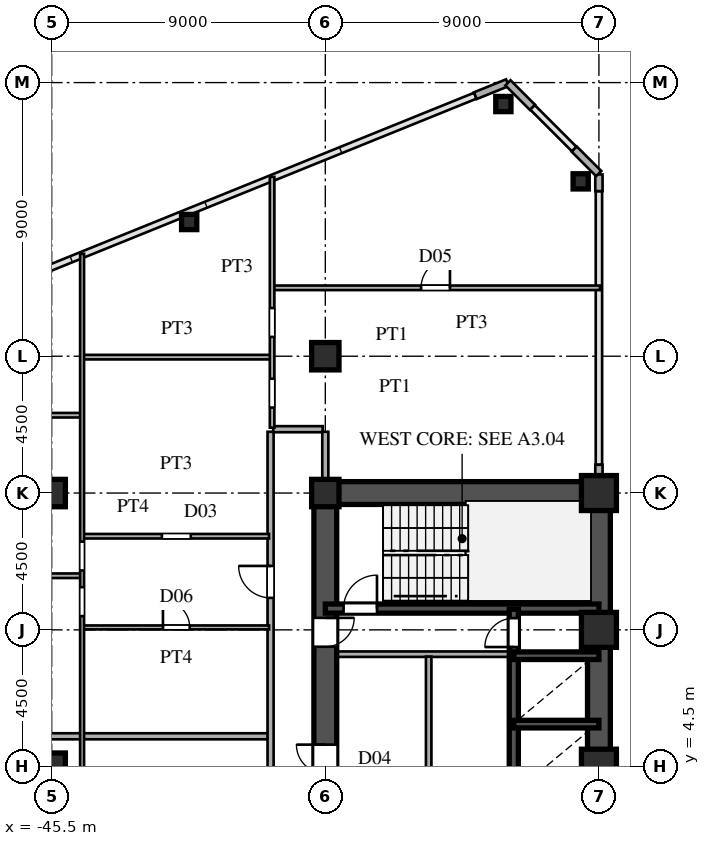
"""IFC4 building model, lengths in metres.
Left out: names, types, materials, properties, quantities, classifications, styles, units other than length and angle.
Written with IfcOpenShell. Run it as: python <this file> out.ifc"""

import sys

from ifc_helpers import new_model, si_unit, direction, frame, frame_2d, origin, origin_2d, place, context, subcontext, project, spatial, rectangle, hollow_rectangle, i_section, extrude, source, transform, mapped, element, fill, save


model = new_model("IFC4")
c1 = context("Model", 3, precision=1e-05, world=origin(), true_north=direction((0.0, 1.0)))
c2 = subcontext(c1, "Body", "Model", "MODEL_VIEW")
j1 = project(units=[si_unit("LENGTHUNIT", "METRE"), si_unit("PLANEANGLEUNIT", "RADIAN")], contexts=[c1])
p1 = place(None, origin())
s1 = spatial("IfcSite", under=j1, at=p1, CompositionType="ELEMENT")
p2 = place(p1, origin())
s2 = spatial("IfcBuilding", under=s1, at=p2, CompositionType="ELEMENT")
p3 = place(p2, frame((0.0, 0.0, 44.1)))
s3 = spatial("IfcBuildingStorey", under=s2, at=p3, CompositionType="ELEMENT", Elevation=44.1)
m1 = source(origin(), c2, "Body", "SweptSolid", [
    extrude(hollow_rectangle(XDim=1.15, YDim=1.15, WallThickness=0.048, at=origin_2d()), origin(), (0.0, 0.0, 1.0), 3.6),
])
for number, where, z_axis, x_axis in (
    (1, (-27.5, 4.5, 0.0), (0.0, 0.0, 1.0), (1.0, 0.0, 0.0)),
    (2, (-27.5, 9.0, 0.0), (0.0, 0.0, 1.0), (1.0, 0.0, 0.0)),
    (3, (-27.5, 13.5, 0.0), (0.0, 0.0, 1.0), (1.0, 0.0, 0.0)),
):
    element("IfcColumn", number, at=place(p3, frame(where, z_axis=z_axis, x_axis=x_axis)), inside=s3, PredefinedType="COLUMN", context=c2, shape_type="MappedRepresentation", body=[
        mapped(m1, transform((0.0, 0.0, 0.0), scale=1.0)),
    ])
m2 = source(origin(), c2, "Body", "SweptSolid", [
    extrude(i_section(OverallWidth=0.9, OverallDepth=0.9, WebThickness=0.036, FlangeThickness=0.055, at=origin_2d()), origin(), (0.0, 0.0, 1.0), 3.6),
])
for number, where, z_axis, x_axis in (
    (4, (-36.5, 13.5, 0.0), (0.0, 0.0, 1.0), (1.0, 0.0, 0.0)),
    (5, (-36.5, 18.0, 0.0), (0.0, 0.0, 1.0), (1.0, 0.0, 0.0)),
    (6, (-45.5, 4.5, 0.0), (0.0, 0.0, 1.0), (1.0, 0.0, 0.0)),
    (7, (-45.5, 13.5, 0.0), (0.0, 0.0, 1.0), (1.0, 0.0, 0.0)),
):
    element("IfcColumn", number, at=place(p3, frame(where, z_axis=z_axis, x_axis=x_axis)), inside=s3, PredefinedType="COLUMN", context=c2, shape_type="MappedRepresentation", body=[
        mapped(m2, transform((0.0, 0.0, 0.0), scale=1.0)),
    ])
m3 = source(origin(), c2, "Body", "SweptSolid", [
    extrude(hollow_rectangle(XDim=0.5, YDim=0.5, WallThickness=0.02, at=origin_2d()), origin(), (0.0, 0.0, 1.0), 3.6),
])
for number, where, z_axis, x_axis in (
    (8, (-28.1, 23.751, 0.0), (0.0, 0.0, 1.0), (1.0, 0.0, 0.0)),
    (9, (-30.643, 26.295, 0.0), (0.0, 0.0, 1.0), (1.0, 0.0, 0.0)),
    (10, (-40.977, 22.414, 0.0), (0.0, 0.0, 1.0), (1.0, 0.0, 0.0)),
):
    element("IfcColumn", number, at=place(p3, frame(where, z_axis=z_axis, x_axis=x_axis)), inside=s3, PredefinedType="COLUMN", context=c2, shape_type="MappedRepresentation", body=[
        mapped(m3, transform((0.0, 0.0, 0.0), scale=1.0)),
    ])
p4 = place(p3, frame((-27.5, 13.88, 0.0), z_axis=(0.0, 0.0, 1.0), x_axis=(0.0, 1.0, 0.0)))
e11 = element("IfcWall", 11, at=p4, inside=s3, PredefinedType="SOLIDWALL", context=c2, shape_type="SweptSolid", body=[
    extrude(rectangle(XDim=0.55, YDim=0.24, at=frame_2d((0.275, 0.0))), origin(), (0.0, 0.0, 1.0), 2.88),
])
p5 = place(p3, frame((-27.5, 23.43, 0.0), z_axis=(0.0, 0.0, 1.0), x_axis=(0.0, 1.0, 0.0)))
e12 = element("IfcWall", 12, at=p5, inside=s3, PredefinedType="SOLIDWALL", context=c2, shape_type="SweptSolid", body=[
    extrude(rectangle(XDim=0.55, YDim=0.24, at=frame_2d((0.275, 0.0))), origin(), (0.0, 0.0, 1.0), 3.38),
])
for number, where, z_axis, x_axis in (
    (13, (-27.507, 24.007, 0.0), (0.0, 0.0, 1.0), (-0.707, 0.707, 0.0)),
    (14, (-29.687, 26.187, 0.0), (0.0, 0.0, 1.0), (-0.707, 0.707, 0.0)),
):
    element("IfcWall", number, at=place(p3, frame(where, z_axis=z_axis, x_axis=x_axis)), inside=s3, PredefinedType="SOLIDWALL", context=c2, shape_type="SweptSolid", body=[
        extrude(rectangle(XDim=1.14, YDim=0.24, at=frame_2d((0.57, 0.0))), origin(), (0.0, 0.0, 1.0), 3.38),
    ])
p6 = place(p3, frame((-30.509, 26.996, 0.0), z_axis=(0.0, 0.0, 1.0), x_axis=(-0.927007103665, -0.375043770452, 0.0)))
e15 = element("IfcWall", 15, at=p6, inside=s3, PredefinedType="SOLIDWALL", context=c2, shape_type="SweptSolid", body=[
    extrude(rectangle(XDim=1.14, YDim=0.24, at=frame_2d((0.57, 0.0))), origin(), (0.0, 0.0, 1.0), 3.38),
])
p7 = place(p3, frame((-27.5, 1.3, 0.0), z_axis=(0.0, 0.0, 1.0), x_axis=(0.0, 1.0, 0.0)))
e16 = element("IfcWall", 16, at=p7, inside=s3, PredefinedType="SHEAR", context=c2, shape_type="SweptSolid", body=[
    extrude(rectangle(XDim=12.2, YDim=0.75, at=frame_2d((6.1, 0.0))), origin(), (0.0, 0.0, 1.0), 3.38),
])
p8 = place(p3, frame((-36.5, 13.5, 0.0), z_axis=(0.0, 0.0, 1.0), x_axis=(1.0, 0.0, 0.0)))
e17 = element("IfcWall", 17, at=p8, inside=s3, PredefinedType="SHEAR", context=c2, shape_type="SweptSolid", body=[
    extrude(rectangle(XDim=9.0, YDim=0.75, at=frame_2d((4.5, 0.0))), origin(), (0.0, 0.0, 1.0), 3.38),
])
p9 = place(p3, frame((-36.5, 8.2, 0.0), z_axis=(0.0, 0.0, 1.0), x_axis=(0.0, 1.0, 0.0)))
e18 = element("IfcWall", 18, at=p9, inside=s3, PredefinedType="SHEAR", context=c2, shape_type="SweptSolid", body=[
    extrude(rectangle(XDim=5.45, YDim=0.75, at=frame_2d((2.725, 0.0))), origin(), (0.0, 0.0, 1.0), 3.38),
])
p10 = place(p9, frame((0.245, 0.0, 0.0)))
e19 = element("IfcOpeningElement", 19, at=p10, cuts=e18, PredefinedType="OPENING", context=c2, shape_type="SweptSolid", body=[
    extrude(rectangle(XDim=0.95, YDim=2.15, at=frame_2d((0.475, 1.075))), frame((0.0, 0.385, 0.0), z_axis=(0.0, -1.0, 0.0), x_axis=(1.0, 0.0, 0.0)), (0.0, 0.0, 1.0), 0.77),
])
p11 = place(p3, frame((-36.5, 1.3, 0.0), z_axis=(0.0, 0.0, 1.0), x_axis=(0.0, 1.0, 0.0)))
e20 = element("IfcWall", 20, at=p11, inside=s3, PredefinedType="SHEAR", context=c2, shape_type="SweptSolid", body=[
    extrude(rectangle(XDim=6.9, YDim=0.75, at=frame_2d((3.45, 0.0))), origin(), (0.0, 0.0, 1.0), 3.38),
])
p12 = place(p11, frame((2.975, 0.0, 0.0)))
e21 = element("IfcOpeningElement", 21, at=p12, cuts=e20, PredefinedType="OPENING", context=c2, shape_type="SweptSolid", body=[
    extrude(rectangle(XDim=0.95, YDim=2.15, at=frame_2d((0.475, 1.075))), frame((0.0, 0.385, 0.0), z_axis=(0.0, -1.0, 0.0), x_axis=(1.0, 0.0, 0.0)), (0.0, 0.0, 1.0), 0.77),
])
p13 = place(p3, frame((-36.5, 9.7, 0.0), z_axis=(0.0, 0.0, 1.0), x_axis=(1.0, 0.0, 0.0)))
e22 = element("IfcWall", 22, at=p13, inside=s3, PredefinedType="SHEAR", context=c2, shape_type="SweptSolid", body=[
    extrude(rectangle(XDim=9.0, YDim=0.3, at=frame_2d((4.5, 0.0))), origin(), (0.0, 0.0, 1.0), 3.38),
])
p14 = place(p13, frame((0.6, 0.0, 0.0)))
e23 = element("IfcOpeningElement", 23, at=p14, cuts=e22, PredefinedType="OPENING", context=c2, shape_type="SweptSolid", body=[
    extrude(rectangle(XDim=1.1, YDim=2.2, at=frame_2d((0.55, 1.1))), frame((0.0, 0.16, 0.0), z_axis=(0.0, -1.0, 0.0), x_axis=(1.0, 0.0, 0.0)), (0.0, 0.0, 1.0), 0.32),
])
for number, where, z_axis, x_axis in (
    (24, (-30.3, 5.9, 0.0), (0.0, 0.0, 1.0), (1.0, 0.0, 0.0)),
    (25, (-30.3, 8.15, 0.0), (0.0, 0.0, 1.0), (1.0, 0.0, 0.0)),
):
    element("IfcWall", number, at=place(p3, frame(where, z_axis=z_axis, x_axis=x_axis)), inside=s3, PredefinedType="SHEAR", context=c2, shape_type="SweptSolid", body=[
        extrude(rectangle(XDim=2.8, YDim=0.25, at=frame_2d((1.4, 0.0))), origin(), (0.0, 0.0, 1.0), 3.38),
    ])
p15 = place(p3, frame((-30.3, 3.6, 0.0), z_axis=(0.0, 0.0, 1.0), x_axis=(0.0, 1.0, 0.0)))
e26 = element("IfcWall", 26, at=p15, inside=s3, PredefinedType="SHEAR", context=c2, shape_type="SweptSolid", body=[
    extrude(rectangle(XDim=2.3, YDim=0.3, at=frame_2d((1.15, 0.0))), origin(), (0.0, 0.0, 1.0), 3.38),
])
p16 = place(p3, frame((-30.3, 5.9, 0.0), z_axis=(0.0, 0.0, 1.0), x_axis=(0.0, 1.0, 0.0)))
e27 = element("IfcWall", 27, at=p16, inside=s3, PredefinedType="SHEAR", context=c2, shape_type="SweptSolid", body=[
    extrude(rectangle(XDim=2.25, YDim=0.3, at=frame_2d((1.125, 0.0))), origin(), (0.0, 0.0, 1.0), 3.38),
])
p17 = place(p3, frame((-30.3, 8.15, 0.0), z_axis=(0.0, 0.0, 1.0), x_axis=(0.0, 1.0, 0.0)))
e28 = element("IfcWall", 28, at=p17, inside=s3, PredefinedType="SHEAR", context=c2, shape_type="SweptSolid", body=[
    extrude(rectangle(XDim=1.53, YDim=0.3, at=frame_2d((0.765, 0.0))), origin(), (0.0, 0.0, 1.0), 3.38),
])
p18 = place(p17, frame((0.285, 0.0, 0.0)))
e29 = element("IfcOpeningElement", 29, at=p18, cuts=e28, PredefinedType="OPENING", context=c2, shape_type="SweptSolid", body=[
    extrude(rectangle(XDim=0.95, YDim=2.15, at=frame_2d((0.475, 1.075))), frame((0.0, 0.16, 0.0), z_axis=(0.0, -1.0, 0.0), x_axis=(1.0, 0.0, 0.0)), (0.0, 0.0, 1.0), 0.32),
])
p19 = place(p3, frame((-36.15, 8.2, 0.0), z_axis=(0.0, 0.0, 1.0), x_axis=(1.0, 0.0, 0.0)))
e30 = element("IfcWall", 30, at=p19, inside=s3, PredefinedType="PARTITIONING", context=c2, shape_type="SweptSolid", body=[
    extrude(rectangle(XDim=5.7, YDim=0.18, at=frame_2d((2.85, 0.0))), origin(), (0.0, 0.0, 1.0), 3.38),
])
p20 = place(p3, frame((-33.1, 1.38, 0.0), z_axis=(0.0, 0.0, 1.0), x_axis=(0.0, 1.0, 0.0)))
e31 = element("IfcWall", 31, at=p20, inside=s3, PredefinedType="PARTITIONING", context=c2, shape_type="SweptSolid", body=[
    extrude(rectangle(XDim=6.74, YDim=0.18, at=frame_2d((3.37, 0.0))), origin(), (0.0, 0.0, 1.0), 3.38),
])
p21 = place(p3, frame((-72.505, 5.5, 0.0), z_axis=(0.0, 0.0, 1.0), x_axis=(1.0, 0.0, 0.0)))
e32 = element("IfcWall", 32, at=p21, inside=s3, PredefinedType="PARTITIONING", context=c2, shape_type="SweptSolid", body=[
    extrude(rectangle(XDim=34.125, YDim=0.2, at=frame_2d((17.062, 0.0))), origin(), (0.0, 0.0, 1.0), 3.38),
])
p22 = place(p3, frame((-44.45, 9.08, 0.0), z_axis=(0.0, 0.0, 1.0), x_axis=(1.0, 0.0, 0.0)))
e33 = element("IfcWall", 33, at=p22, inside=s3, PredefinedType="PARTITIONING", context=c2, shape_type="SweptSolid", body=[
    extrude(rectangle(XDim=6.1, YDim=0.13, at=frame_2d((3.05, 0.0))), origin(), (0.0, 0.0, 1.0), 3.38),
])
p23 = place(p22, frame((2.61, 0.0, 0.0)))
e34 = element("IfcOpeningElement", 34, at=p23, cuts=e33, PredefinedType="OPENING", context=c2, shape_type="SweptSolid", body=[
    extrude(rectangle(XDim=0.88, YDim=2.1, at=frame_2d((0.44, 1.05))), frame((0.0, 0.075, 0.0), z_axis=(0.0, -1.0, 0.0), x_axis=(1.0, 0.0, 0.0)), (0.0, 0.0, 1.0), 0.15),
])
p24 = place(p3, frame((-70.613, 10.78, 0.0), z_axis=(0.0, 0.0, 1.0), x_axis=(1.0, 0.0, 0.0)))
e35 = element("IfcWall", 35, at=p24, inside=s3, PredefinedType="PARTITIONING", context=c2, shape_type="SweptSolid", body=[
    extrude(rectangle(XDim=26.063, YDim=0.15, at=frame_2d((13.031, 0.0))), origin(), (0.0, 0.0, 1.0), 3.38),
])
p25 = place(p24, frame((4.749, 0.0, 0.0)))
e36 = element("IfcOpeningElement", 36, at=p25, cuts=e35, PredefinedType="OPENING", context=c2, shape_type="SweptSolid", body=[
    extrude(rectangle(XDim=0.95, YDim=2.15, at=frame_2d((0.475, 1.075))), frame((0.0, 0.085, 0.0), z_axis=(0.0, -1.0, 0.0), x_axis=(1.0, 0.0, 0.0)), (0.0, 0.0, 1.0), 0.17),
])
p26 = place(p3, frame((-44.45, 12.08, 0.0), z_axis=(0.0, 0.0, 1.0), x_axis=(1.0, 0.0, 0.0)))
e37 = element("IfcWall", 37, at=p26, inside=s3, PredefinedType="PARTITIONING", context=c2, shape_type="SweptSolid", body=[
    extrude(rectangle(XDim=6.1, YDim=0.15, at=frame_2d((3.05, 0.0))), origin(), (0.0, 0.0, 1.0), 3.38),
])
p27 = place(p26, frame((2.575, 0.0, 0.0)))
e38 = element("IfcOpeningElement", 38, at=p27, cuts=e37, PredefinedType="OPENING", context=c2, shape_type="SweptSolid", body=[
    extrude(rectangle(XDim=0.95, YDim=2.15, at=frame_2d((0.475, 1.075))), frame((0.0, 0.085, 0.0), z_axis=(0.0, -1.0, 0.0), x_axis=(1.0, 0.0, 0.0)), (0.0, 0.0, 1.0), 0.17),
])
p28 = place(p3, frame((-38.215, 15.6, 0.0), z_axis=(0.0, 0.0, 1.0), x_axis=(1.0, 0.0, 0.0)))
e39 = element("IfcWall", 39, at=p28, inside=s3, PredefinedType="PARTITIONING", context=c2, shape_type="SweptSolid", body=[
    extrude(rectangle(XDim=1.63, YDim=0.2, at=frame_2d((0.815, 0.0))), origin(), (0.0, 0.0, 1.0), 3.38),
])
p29 = place(p3, frame((-54.45, 16.06, 0.0), z_axis=(0.0, 0.0, 1.0), x_axis=(1.0, 0.0, 0.0)))
e40 = element("IfcWall", 40, at=p29, inside=s3, PredefinedType="PARTITIONING", context=c2, shape_type="SweptSolid", body=[
    extrude(rectangle(XDim=9.9, YDim=0.15, at=frame_2d((4.95, 0.0))), origin(), (0.0, 0.0, 1.0), 3.38),
])
p30 = place(p29, frame((4.475, 0.0, 0.0)))
e41 = element("IfcOpeningElement", 41, at=p30, cuts=e40, PredefinedType="OPENING", context=c2, shape_type="SweptSolid", body=[
    extrude(rectangle(XDim=0.95, YDim=2.15, at=frame_2d((0.475, 1.075))), frame((0.0, 0.085, 0.0), z_axis=(0.0, -1.0, 0.0), x_axis=(1.0, 0.0, 0.0)), (0.0, 0.0, 1.0), 0.17),
])
p31 = place(p3, frame((-44.45, 17.97, 0.0), z_axis=(0.0, 0.0, 1.0), x_axis=(1.0, 0.0, 0.0)))
e42 = element("IfcWall", 42, at=p31, inside=s3, PredefinedType="PARTITIONING", context=c2, shape_type="SweptSolid", body=[
    extrude(rectangle(XDim=6.15, YDim=0.15, at=frame_2d((3.075, 0.0))), origin(), (0.0, 0.0, 1.0), 3.38),
])
p32 = place(p3, frame((-38.2, 20.25, 0.0), z_axis=(0.0, 0.0, 1.0), x_axis=(1.0, 0.0, 0.0)))
e43 = element("IfcWall", 43, at=p32, inside=s3, PredefinedType="PARTITIONING", context=c2, shape_type="SweptSolid", body=[
    extrude(rectangle(XDim=10.735, YDim=0.15, at=frame_2d((5.367, 0.0))), origin(), (0.0, 0.0, 1.0), 3.38),
])
p33 = place(p32, frame((4.85, 0.0, 0.0)))
e44 = element("IfcOpeningElement", 44, at=p33, cuts=e43, PredefinedType="OPENING", context=c2, shape_type="SweptSolid", body=[
    extrude(rectangle(XDim=0.95, YDim=2.15, at=frame_2d((0.475, 1.075))), frame((0.0, 0.085, 0.0), z_axis=(0.0, -1.0, 0.0), x_axis=(1.0, 0.0, 0.0)), (0.0, 0.0, 1.0), 0.17),
])
p34 = place(p3, frame((-44.5, 1.352, 0.0), z_axis=(0.0, 0.0, 1.0), x_axis=(0.0, 1.0, 0.0)))
e45 = element("IfcWall", 45, at=p34, inside=s3, PredefinedType="PARTITIONING", context=c2, shape_type="SweptSolid", body=[
    extrude(rectangle(XDim=20.016, YDim=0.13, at=frame_2d((10.008, 0.0))), origin(), (0.0, 0.0, 1.0), 3.38),
])
p35 = place(p34, frame((8.101, 0.0, 0.0)))
e46 = element("IfcOpeningElement", 46, at=p35, cuts=e45, PredefinedType="OPENING", context=c2, shape_type="SweptSolid", body=[
    extrude(rectangle(XDim=0.95, YDim=2.15, at=frame_2d((0.475, 1.075))), frame((0.0, 0.075, 0.0), z_axis=(0.0, -1.0, 0.0), x_axis=(1.0, 0.0, 0.0)), (0.0, 0.0, 1.0), 0.15),
])
p36 = place(p34, frame((9.601, 0.0, 0.0)))
e47 = element("IfcOpeningElement", 47, at=p36, cuts=e45, PredefinedType="OPENING", context=c2, shape_type="SweptSolid", body=[
    extrude(rectangle(XDim=0.95, YDim=2.15, at=frame_2d((0.475, 1.075))), frame((0.0, 0.075, 0.0), z_axis=(0.0, -1.0, 0.0), x_axis=(1.0, 0.0, 0.0)), (0.0, 0.0, 1.0), 0.15),
])
p37 = place(p3, frame((-38.3, -15.515, 0.0), z_axis=(0.0, 0.0, 1.0), x_axis=(0.0, 1.0, 0.0)))
e48 = element("IfcWall", 48, at=p37, inside=s3, PredefinedType="PARTITIONING", context=c2, shape_type="SweptSolid", body=[
    extrude(rectangle(XDim=31.03, YDim=0.2, at=frame_2d((15.515, 0.0))), origin(), (0.0, 0.0, 1.0), 3.38),
])
p38 = place(p37, frame((2.345, 0.0, 0.0)))
e49 = element("IfcOpeningElement", 49, at=p38, cuts=e48, PredefinedType="OPENING", context=c2, shape_type="SweptSolid", body=[
    extrude(rectangle(XDim=1.05, YDim=2.25, at=frame_2d((0.525, 1.125))), frame((0.0, 0.11, 0.0), z_axis=(0.0, -1.0, 0.0), x_axis=(1.0, 0.0, 0.0)), (0.0, 0.0, 1.0), 0.22),
])
p39 = place(p37, frame((13.28, 0.0, 0.0)))
e50 = element("IfcOpeningElement", 50, at=p39, cuts=e48, PredefinedType="OPENING", context=c2, shape_type="SweptSolid", body=[
    extrude(rectangle(XDim=1.05, YDim=2.25, at=frame_2d((0.525, 1.125))), frame((0.0, 0.11, 0.0), z_axis=(0.0, -1.0, 0.0), x_axis=(1.0, 0.0, 0.0)), (0.0, 0.0, 1.0), 0.22),
])
p40 = place(p37, frame((25.567, 0.0, 0.0)))
e51 = element("IfcOpeningElement", 51, at=p40, cuts=e48, PredefinedType="OPENING", context=c2, shape_type="SweptSolid", body=[
    extrude(rectangle(XDim=1.05, YDim=2.25, at=frame_2d((0.525, 1.125))), frame((0.0, 0.11, 0.0), z_axis=(0.0, -1.0, 0.0), x_axis=(1.0, 0.0, 0.0)), (0.0, 0.0, 1.0), 0.22),
])
p41 = place(p3, frame((-38.25, 15.65, 0.0), z_axis=(0.0, 0.0, 1.0), x_axis=(0.0, 1.0, 0.0)))
e52 = element("IfcWall", 52, at=p41, inside=s3, PredefinedType="PARTITIONING", context=c2, shape_type="SweptSolid", body=[
    extrude(rectangle(XDim=8.248, YDim=0.15, at=frame_2d((4.124, 0.0))), origin(), (0.0, 0.0, 1.0), 3.38),
])
p42 = place(p41, frame((0.66, 0.0, 0.0)))
e53 = element("IfcOpeningElement", 53, at=p42, cuts=e52, PredefinedType="OPENING", context=c2, shape_type="SweptSolid", body=[
    extrude(rectangle(XDim=0.95, YDim=2.15, at=frame_2d((0.475, 1.075))), frame((0.0, 0.085, 0.0), z_axis=(0.0, -1.0, 0.0), x_axis=(1.0, 0.0, 0.0)), (0.0, 0.0, 1.0), 0.17),
])
p43 = place(p41, frame((2.985, 0.0, 0.0)))
e54 = element("IfcOpeningElement", 54, at=p43, cuts=e52, PredefinedType="OPENING", context=c2, shape_type="SweptSolid", body=[
    extrude(rectangle(XDim=0.95, YDim=2.15, at=frame_2d((0.475, 1.075))), frame((0.0, 0.085, 0.0), z_axis=(0.0, -1.0, 0.0), x_axis=(1.0, 0.0, 0.0)), (0.0, 0.0, 1.0), 0.17),
])
p44 = place(p3, frame((-36.5, 13.88, 0.0), z_axis=(0.0, 0.0, 1.0), x_axis=(0.0, 1.0, 0.0)))
e55 = element("IfcWall", 55, at=p44, inside=s3, PredefinedType="PARTITIONING", context=c2, shape_type="SweptSolid", body=[
    extrude(rectangle(XDim=1.635, YDim=0.2, at=frame_2d((0.817, 0.0))), origin(), (0.0, 0.0, 1.0), 2.68),
])
m4 = source(origin(), c2, "Body", "SweptSolid", [
    extrude(rectangle(XDim=0.95, YDim=2.15, at=frame_2d((0.475, 1.075))), frame((0.0, 0.025, 0.0), z_axis=(0.0, -1.0, 0.0), x_axis=(1.0, 0.0, 0.0)), (0.0, 0.0, 1.0), 0.05),
])
p45 = place(p10, frame((0.95, 0.0, 0.0), z_axis=(0.0, 0.0, 1.0), x_axis=(-1.0, 0.0, 0.0)))
e56 = element("IfcDoor", 56, at=p45, inside=s3, OperationType="SINGLE_SWING_RIGHT", PredefinedType="DOOR", context=c2, shape_type="MappedRepresentation", body=[
    mapped(m4, transform((0.0, 0.0, 0.0), scale=1.0)),
])
fill(e19, e56)
p46 = place(p12, origin())
e57 = element("IfcDoor", 57, at=p46, inside=s3, OperationType="SINGLE_SWING_RIGHT", PredefinedType="DOOR", context=c2, shape_type="MappedRepresentation", body=[
    mapped(m4, transform((0.0, 0.0, 0.0), scale=1.0)),
])
fill(e21, e57)
m5 = source(origin(), c2, "Body", "SweptSolid", [
    extrude(rectangle(XDim=1.1, YDim=2.2, at=frame_2d((0.55, 1.1))), frame((0.0, 0.025, 0.0), z_axis=(0.0, -1.0, 0.0), x_axis=(1.0, 0.0, 0.0)), (0.0, 0.0, 1.0), 0.05),
])
p47 = place(p14, origin())
e58 = element("IfcDoor", 58, at=p47, inside=s3, OperationType="SINGLE_SWING_RIGHT", PredefinedType="DOOR", context=c2, shape_type="MappedRepresentation", body=[
    mapped(m5, transform((0.0, 0.0, 0.0), scale=1.0)),
])
fill(e23, e58)
p48 = place(p18, origin())
e59 = element("IfcDoor", 59, at=p48, inside=s3, OperationType="SINGLE_SWING_LEFT", PredefinedType="DOOR", context=c2, shape_type="MappedRepresentation", body=[
    mapped(m4, transform((0.0, 0.0, 0.0), scale=1.0)),
])
fill(e29, e59)
m6 = source(origin(), c2, "Body", "SweptSolid", [
    extrude(rectangle(XDim=0.88, YDim=2.1, at=frame_2d((0.44, 1.05))), frame((0.0, 0.025, 0.0), z_axis=(0.0, -1.0, 0.0), x_axis=(1.0, 0.0, 0.0)), (0.0, 0.0, 1.0), 0.05),
])
p49 = place(p23, origin())
e60 = element("IfcDoor", 60, at=p49, inside=s3, OperationType="SINGLE_SWING_LEFT", PredefinedType="DOOR", context=c2, shape_type="MappedRepresentation", body=[
    mapped(m6, transform((0.0, 0.0, 0.0), scale=1.0)),
])
fill(e34, e60)
m7 = source(origin(), c2, "Body", "SweptSolid", [
    extrude(rectangle(XDim=0.95, YDim=2.15, at=frame_2d((0.475, 1.075))), frame((0.0, 0.025, 0.0), z_axis=(0.0, -1.0, 0.0), x_axis=(1.0, 0.0, 0.0)), (0.0, 0.0, 1.0), 0.05),
])
p50 = place(p33, origin())
e61 = element("IfcDoor", 61, at=p50, inside=s3, OperationType="SINGLE_SWING_RIGHT", PredefinedType="DOOR", context=c2, shape_type="MappedRepresentation", body=[
    mapped(m7, transform((0.0, 0.0, 0.0), scale=1.0)),
])
fill(e44, e61)
m8 = source(origin(), c2, "Body", "SweptSolid", [
    extrude(rectangle(XDim=1.05, YDim=2.25, at=frame_2d((0.525, 1.125))), frame((0.0, 0.025, 0.0), z_axis=(0.0, -1.0, 0.0), x_axis=(1.0, 0.0, 0.0)), (0.0, 0.0, 1.0), 0.05),
])
p51 = place(p40, origin())
e62 = element("IfcDoor", 62, at=p51, inside=s3, OperationType="SINGLE_SWING_RIGHT", PredefinedType="DOOR", context=c2, shape_type="MappedRepresentation", body=[
    mapped(m8, transform((0.0, 0.0, 0.0), scale=1.0)),
])
fill(e51, e62)
save(model, sys.argv[1])
